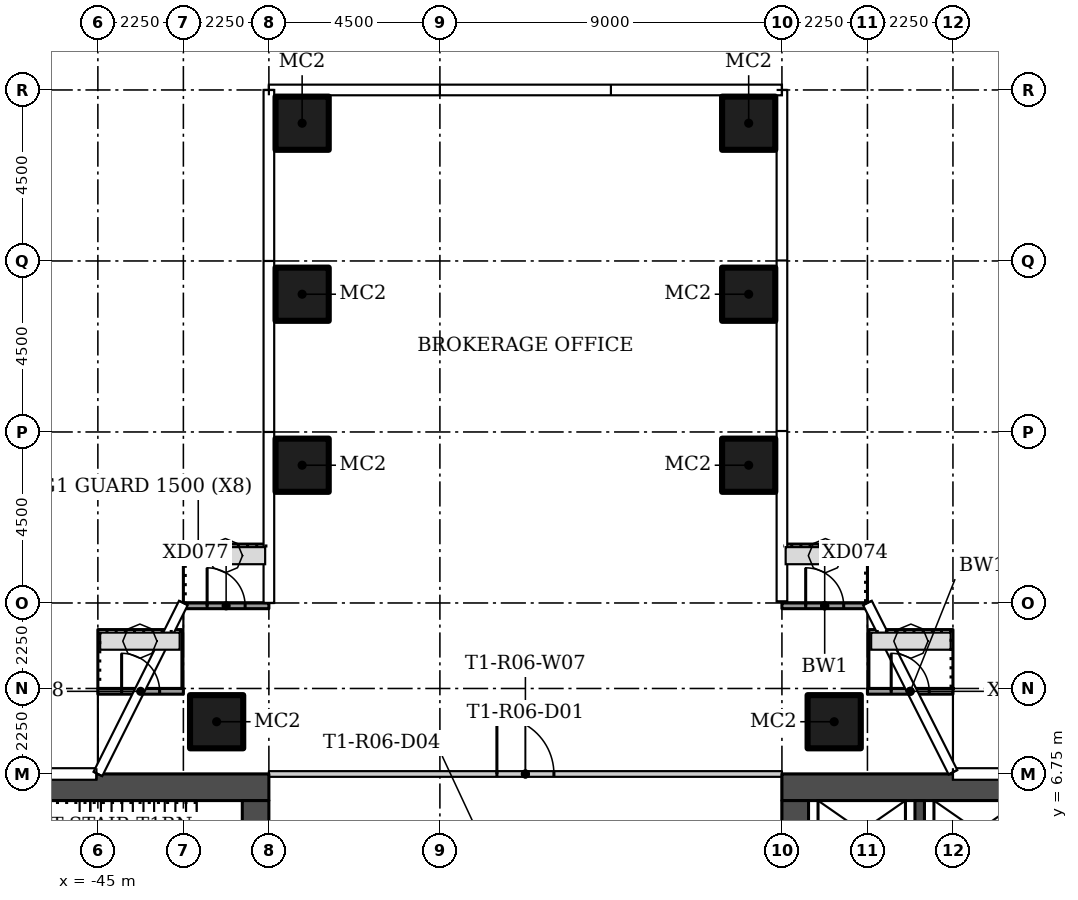
"""IFC4 building model, lengths in metres.
Left out: names, types, materials, properties, quantities, classifications, styles, units other than length and angle.
Written with IfcOpenShell. Run it as: python <this file> out.ifc"""

import sys

from ifc_helpers import new_model, si_unit, direction, frame, frame_2d, origin, origin_2d, place, context, subcontext, project, spatial, rectangle, hollow_rectangle, extrude, element, fill, save


model = new_model("IFC4")
c1 = context("Model", 3, precision=1e-05, world=origin(), true_north=direction((0.0, 1.0)))
c2 = subcontext(c1, "Body", "Model", "MODEL_VIEW")
j1 = project(units=[si_unit("LENGTHUNIT", "METRE"), si_unit("PLANEANGLEUNIT", "RADIAN")], contexts=[c1])
p1 = place(None, origin())
s1 = spatial("IfcSite", under=j1, at=p1, CompositionType="ELEMENT")
p2 = place(p1, origin())
s2 = spatial("IfcBuilding", under=s1, at=p2, CompositionType="ELEMENT")
p3 = place(p2, frame((0.0, 0.0, 61.5)))
s3 = spatial("IfcBuildingStorey", under=s2, at=p3, CompositionType="ELEMENT", Elevation=61.5)
for number, where in (
    (1, (-25.625, 8.125, 0.0)),
    (2, (-41.875, 8.125, 0.0)),
    (3, (-39.625, 14.875, 0.0)),
    (4, (-39.625, 19.375, 0.0)),
    (5, (-39.625, 23.875, 0.0)),
    (6, (-27.875, 14.875, 0.0)),
    (7, (-27.875, 19.375, 0.0)),
    (8, (-27.875, 23.875, 0.0)),
):
    element("IfcColumn", number, at=place(p3, frame(where)), inside=s3, PredefinedType="COLUMN", context=c2, shape_type="SweptSolid", body=[
        extrude(hollow_rectangle(XDim=1.4, YDim=1.4, WallThickness=0.05, at=origin_2d()), origin(), (0.0, 0.0, 1.0), 3.55),
    ])
p4 = place(p3, frame((-40.5, 6.75, 0.0)))
e9 = element("IfcWall", 9, at=p4, inside=s3, PredefinedType="PARTITIONING", context=c2, shape_type="SweptSolid", body=[
    extrude(rectangle(XDim=13.5, YDim=0.15, at=frame_2d((6.75, 0.0))), origin(), (0.0, 0.0, 1.0), 3.55),
])
p5 = place(p4, frame((6.0, 0.0, 0.0)))
e10 = element("IfcOpeningElement", 10, at=p5, cuts=e9, PredefinedType="OPENING", context=c2, shape_type="SweptSolid", body=[
    extrude(rectangle(XDim=1.5, YDim=2.1, at=frame_2d((0.75, 1.05))), frame((0.0, 0.085, 0.0), z_axis=(0.0, -1.0, 0.0), x_axis=(1.0, 0.0, 0.0)), (0.0, 0.0, 1.0), 0.17),
])
p6 = place(p3, frame((-24.75, 8.925, 0.0)))
e11 = element("IfcWall", 11, at=p6, inside=s3, PredefinedType="SOLIDWALL", context=c2, shape_type="SweptSolid", body=[
    extrude(rectangle(XDim=2.25, YDim=0.15, at=frame_2d((1.125, 0.0))), origin(), (0.0, 0.0, 1.0), 3.45),
])
p7 = place(p6, frame((0.625, 0.0, 0.0)))
e12 = element("IfcOpeningElement", 12, at=p7, cuts=e11, PredefinedType="OPENING", context=c2, shape_type="SweptSolid", body=[
    extrude(rectangle(XDim=1.0, YDim=2.4, at=frame_2d((0.5, 1.2))), frame((0.0, 0.085, 0.0), z_axis=(0.0, -1.0, 0.0), x_axis=(1.0, 0.0, 0.0)), (0.0, 0.0, 1.0), 0.17),
])
p8 = place(p3, frame((-27.0, 11.175, 0.0)))
e13 = element("IfcWall", 13, at=p8, inside=s3, PredefinedType="SOLIDWALL", context=c2, shape_type="SweptSolid", body=[
    extrude(rectangle(XDim=2.25, YDim=0.15, at=frame_2d((1.125, 0.0))), origin(), (0.0, 0.0, 1.0), 3.45),
])
p9 = place(p8, frame((0.625, 0.0, 0.0)))
e14 = element("IfcOpeningElement", 14, at=p9, cuts=e13, PredefinedType="OPENING", context=c2, shape_type="SweptSolid", body=[
    extrude(rectangle(XDim=1.0, YDim=2.4, at=frame_2d((0.5, 1.2))), frame((0.0, 0.085, 0.0), z_axis=(0.0, -1.0, 0.0), x_axis=(1.0, 0.0, 0.0)), (0.0, 0.0, 1.0), 0.17),
])
p10 = place(p3, frame((-42.75, 11.175, 0.0)))
e15 = element("IfcWall", 15, at=p10, inside=s3, PredefinedType="SOLIDWALL", context=c2, shape_type="SweptSolid", body=[
    extrude(rectangle(XDim=2.25, YDim=0.15, at=frame_2d((1.125, 0.0))), origin(), (0.0, 0.0, 1.0), 3.45),
])
p11 = place(p10, frame((0.625, 0.0, 0.0)))
e16 = element("IfcOpeningElement", 16, at=p11, cuts=e15, PredefinedType="OPENING", context=c2, shape_type="SweptSolid", body=[
    extrude(rectangle(XDim=1.0, YDim=2.4, at=frame_2d((0.5, 1.2))), frame((0.0, 0.085, 0.0), z_axis=(0.0, -1.0, 0.0), x_axis=(1.0, 0.0, 0.0)), (0.0, 0.0, 1.0), 0.17),
])
p12 = place(p3, frame((-45.0, 8.925, 0.0)))
e17 = element("IfcWall", 17, at=p12, inside=s3, PredefinedType="SOLIDWALL", context=c2, shape_type="SweptSolid", body=[
    extrude(rectangle(XDim=2.25, YDim=0.15, at=frame_2d((1.125, 0.0))), origin(), (0.0, 0.0, 1.0), 3.45),
])
p13 = place(p12, frame((0.625, 0.0, 0.0)))
e18 = element("IfcOpeningElement", 18, at=p13, cuts=e17, PredefinedType="OPENING", context=c2, shape_type="SweptSolid", body=[
    extrude(rectangle(XDim=1.0, YDim=2.4, at=frame_2d((0.5, 1.2))), frame((0.0, 0.085, 0.0), z_axis=(0.0, -1.0, 0.0), x_axis=(1.0, 0.0, 0.0)), (0.0, 0.0, 1.0), 0.17),
])
p14 = place(p3, frame((-27.0, 6.4, 0.0)))
e19 = element("IfcWall", 19, at=p14, inside=s3, PredefinedType="SHEAR", context=c2, shape_type="SweptSolid", body=[
    extrude(rectangle(XDim=13.5, YDim=0.7, at=frame_2d((6.75, 0.0))), origin(), (0.0, 0.0, 1.0), 3.55),
])
p15 = place(p3, frame((-26.65, 6.05, 0.0), z_axis=(0.0, 0.0, 1.0), x_axis=(0.0, -1.0, 0.0)))
e20 = element("IfcWall", 20, at=p15, inside=s3, PredefinedType="SHEAR", context=c2, shape_type="SweptSolid", body=[
    extrude(rectangle(XDim=12.1, YDim=0.7, at=frame_2d((6.05, 0.0))), origin(), (0.0, 0.0, 1.0), 3.55),
])
p16 = place(p15, frame((3.9, 0.0, 0.0)))
e21 = element("IfcOpeningElement", 21, at=p16, cuts=e20, PredefinedType="OPENING", context=c2, shape_type="SweptSolid", body=[
    extrude(rectangle(XDim=1.8, YDim=2.4, at=frame_2d((0.9, 1.2))), frame((0.0, 0.36, 0.0), z_axis=(0.0, -1.0, 0.0), x_axis=(1.0, 0.0, 0.0)), (0.0, 0.0, 1.0), 0.72),
])
p17 = place(p3, frame((-23.375, 3.25, 0.0), z_axis=(0.0, 0.0, 1.0), x_axis=(0.0, 1.0, 0.0)))
e22 = element("IfcWall", 22, at=p17, inside=s3, PredefinedType="SHEAR", context=c2, shape_type="SweptSolid", body=[
    extrude(rectangle(XDim=2.8, YDim=0.25, at=frame_2d((1.4, 0.0))), origin(), (0.0, 0.0, 1.0), 3.55),
])
p18 = place(p3, frame((-40.5, 6.4, 0.0), z_axis=(0.0, 0.0, 1.0), x_axis=(-1.0, 0.0, 0.0)))
e23 = element("IfcWall", 23, at=p18, inside=s3, PredefinedType="SHEAR", context=c2, shape_type="SweptSolid", body=[
    extrude(rectangle(XDim=13.5, YDim=0.7, at=frame_2d((6.75, 0.0))), origin(), (0.0, 0.0, 1.0), 3.55),
])
p19 = place(p3, frame((-40.85, -6.05, 0.0), z_axis=(0.0, 0.0, 1.0), x_axis=(0.0, 1.0, 0.0)))
e24 = element("IfcWall", 24, at=p19, inside=s3, PredefinedType="SHEAR", context=c2, shape_type="SweptSolid", body=[
    extrude(rectangle(XDim=12.1, YDim=0.7, at=frame_2d((6.05, 0.0))), origin(), (0.0, 0.0, 1.0), 3.55),
])
p20 = place(p19, frame((6.4, 0.0, 0.0)))
e25 = element("IfcOpeningElement", 25, at=p20, cuts=e24, PredefinedType="OPENING", context=c2, shape_type="SweptSolid", body=[
    extrude(rectangle(XDim=1.8, YDim=2.4, at=frame_2d((0.9, 1.2))), frame((0.0, 0.36, 0.0), z_axis=(0.0, -1.0, 0.0), x_axis=(1.0, 0.0, 0.0)), (0.0, 0.0, 1.0), 0.72),
])
p21 = place(p5, origin())
e26 = element("IfcDoor", 26, at=p21, inside=s3, OperationType="DOUBLE_DOOR_SINGLE_SWING", PredefinedType="DOOR", context=c2, shape_type="SweptSolid", body=[
    extrude(rectangle(XDim=1.5, YDim=2.1, at=frame_2d((0.75, 1.05))), frame((0.0, 0.025, 0.0), z_axis=(0.0, -1.0, 0.0), x_axis=(1.0, 0.0, 0.0)), (0.0, 0.0, 1.0), 0.05),
])
fill(e10, e26)
p22 = place(p7, origin())
e27 = element("IfcDoor", 27, at=p22, inside=s3, OperationType="SINGLE_SWING_RIGHT", PredefinedType="DOOR", context=c2, shape_type="SweptSolid", body=[
    extrude(rectangle(XDim=1.0, YDim=2.4, at=frame_2d((0.5, 1.2))), frame((0.0, 0.025, 0.0), z_axis=(0.0, -1.0, 0.0), x_axis=(1.0, 0.0, 0.0)), (0.0, 0.0, 1.0), 0.05),
])
fill(e12, e27)
p23 = place(p9, origin())
e28 = element("IfcDoor", 28, at=p23, inside=s3, OperationType="SINGLE_SWING_LEFT", PredefinedType="DOOR", context=c2, shape_type="SweptSolid", body=[
    extrude(rectangle(XDim=1.0, YDim=2.4, at=frame_2d((0.5, 1.2))), frame((0.0, 0.025, 0.0), z_axis=(0.0, -1.0, 0.0), x_axis=(1.0, 0.0, 0.0)), (0.0, 0.0, 1.0), 0.05),
])
fill(e14, e28)
p24 = place(p11, origin())
e29 = element("IfcDoor", 29, at=p24, inside=s3, OperationType="SINGLE_SWING_LEFT", PredefinedType="DOOR", context=c2, shape_type="SweptSolid", body=[
    extrude(rectangle(XDim=1.0, YDim=2.4, at=frame_2d((0.5, 1.2))), frame((0.0, 0.025, 0.0), z_axis=(0.0, -1.0, 0.0), x_axis=(1.0, 0.0, 0.0)), (0.0, 0.0, 1.0), 0.05),
])
fill(e16, e29)
p25 = place(p13, origin())
e30 = element("IfcDoor", 30, at=p25, inside=s3, OperationType="SINGLE_SWING_RIGHT", PredefinedType="DOOR", context=c2, shape_type="SweptSolid", body=[
    extrude(rectangle(XDim=1.0, YDim=2.4, at=frame_2d((0.5, 1.2))), frame((0.0, 0.025, 0.0), z_axis=(0.0, -1.0, 0.0), x_axis=(1.0, 0.0, 0.0)), (0.0, 0.0, 1.0), 0.05),
])
fill(e18, e30)
save(model, sys.argv[1])
